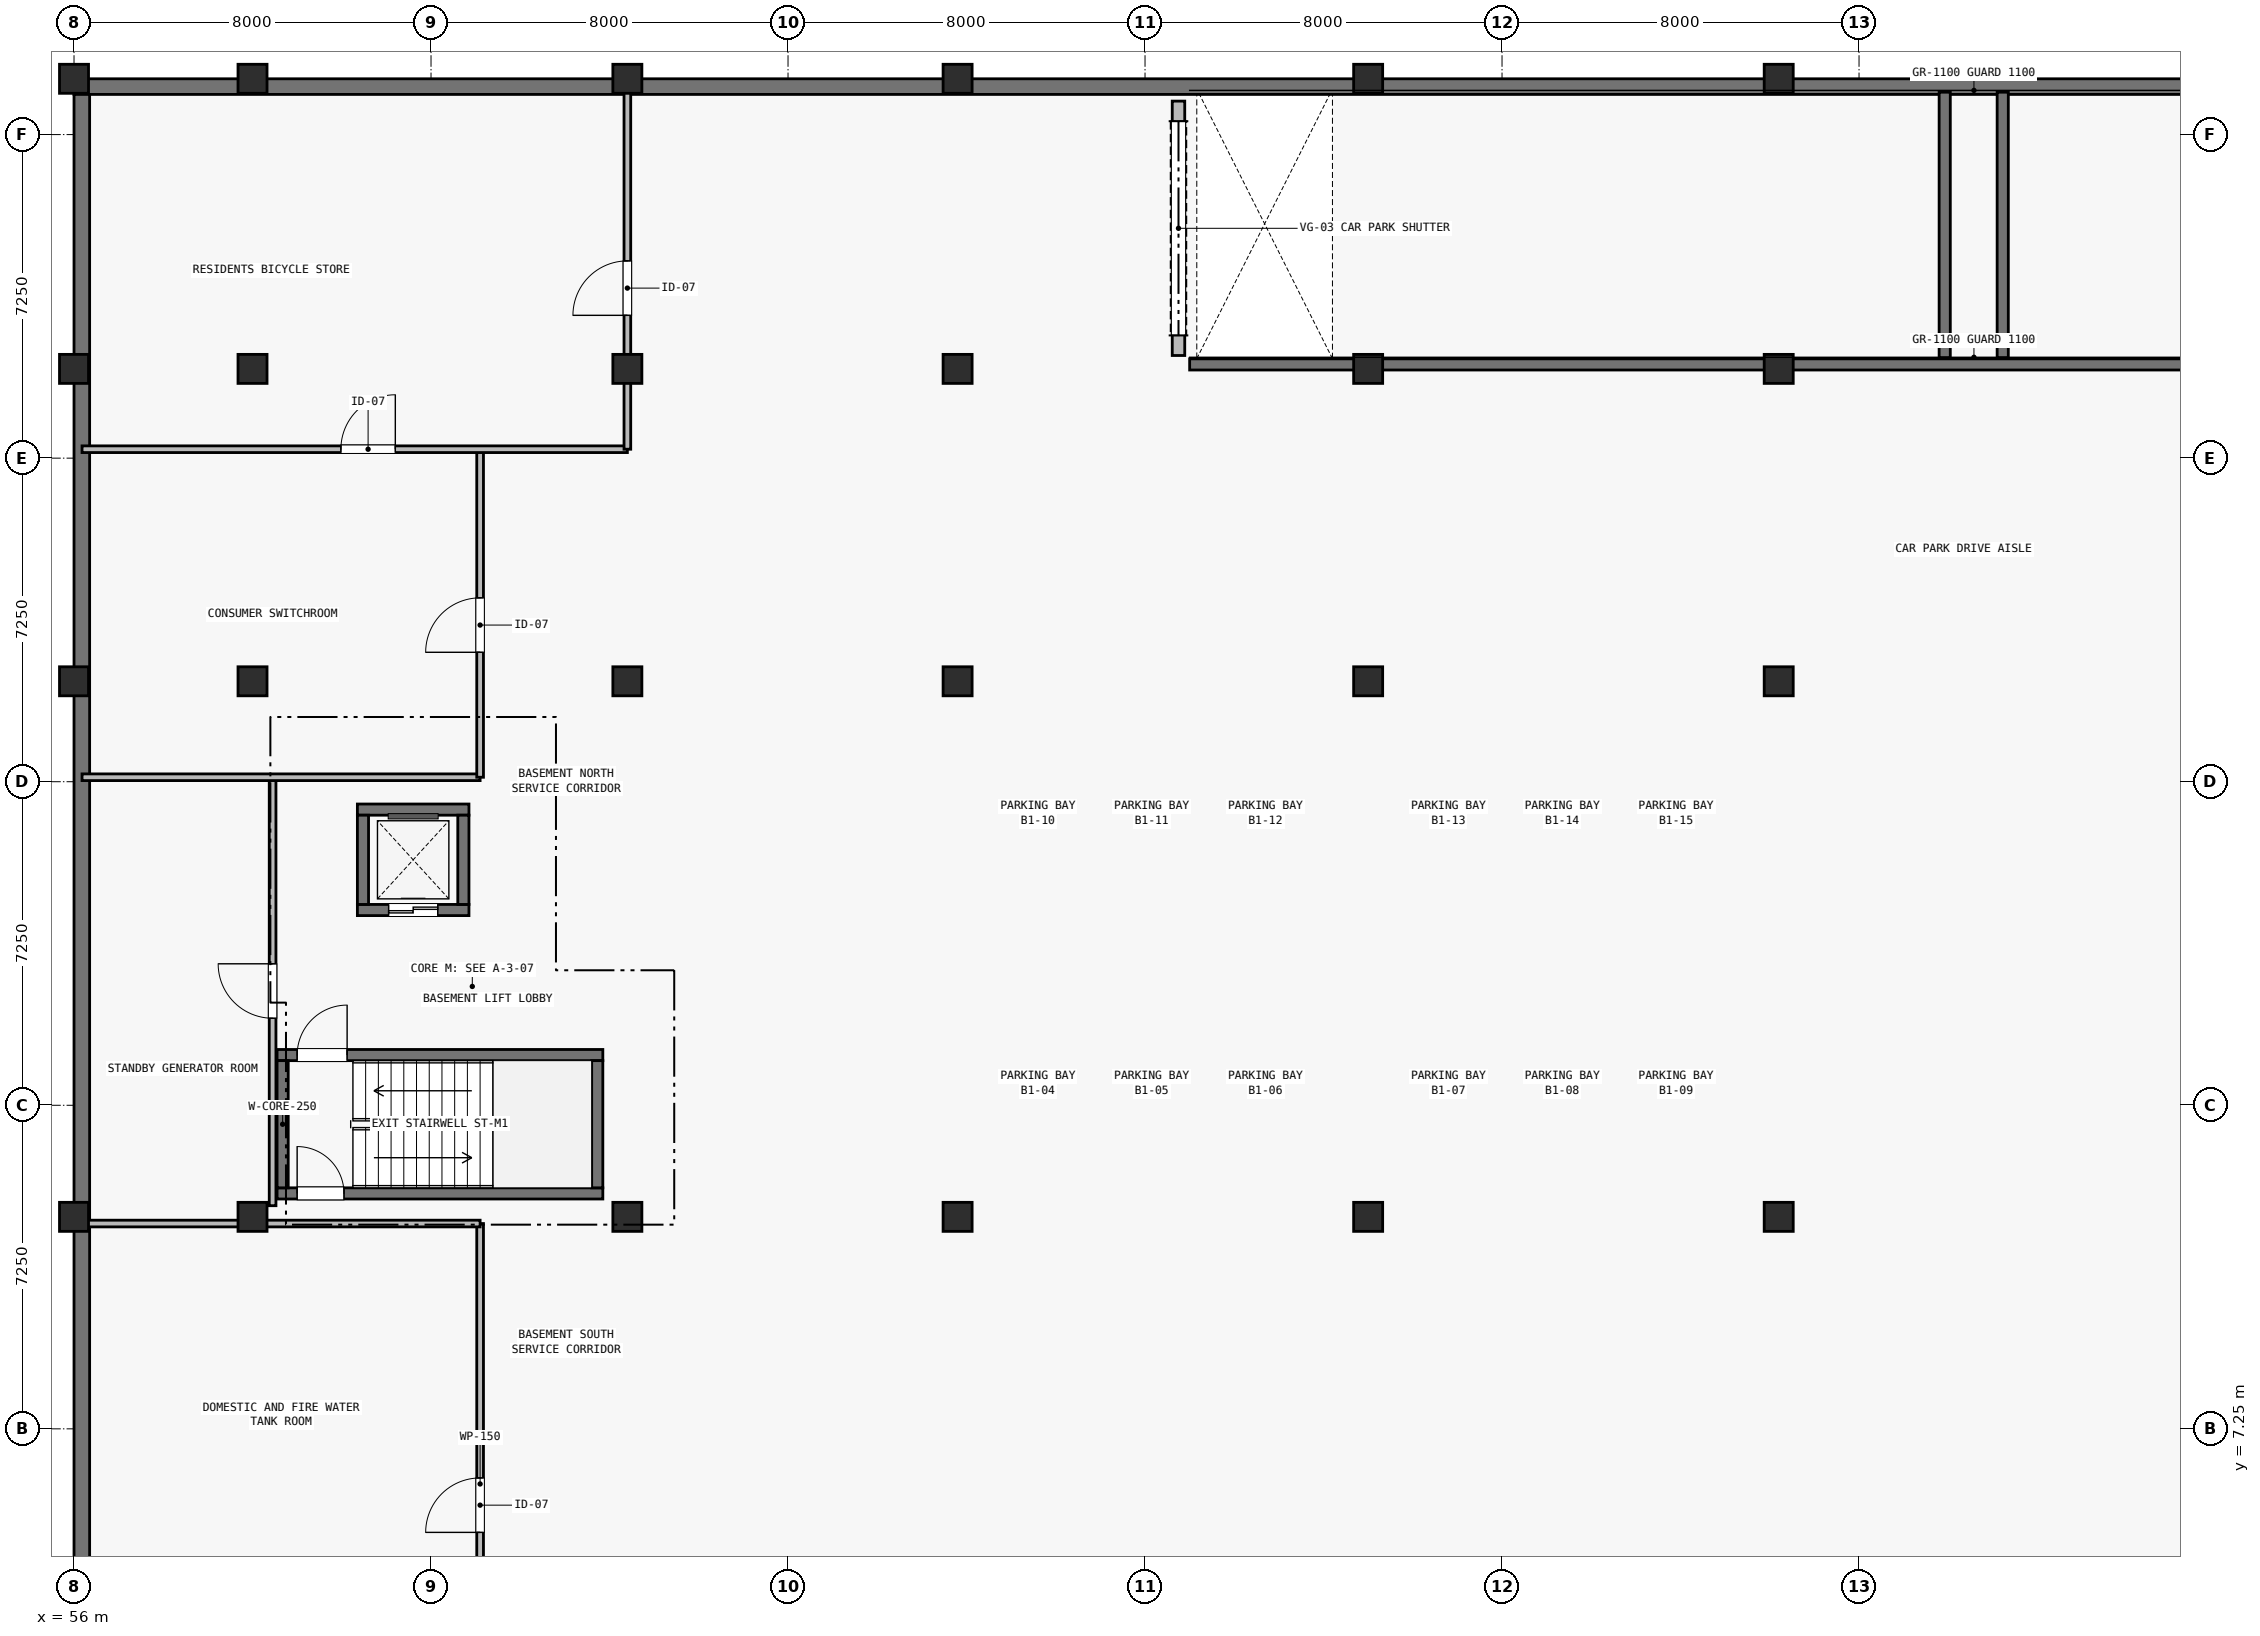
"""IFC4 building model, lengths in metres.
Left out: names, types, materials, properties, quantities, classifications, styles, units other than length and angle.
Written with IfcOpenShell. Run it as: python <this file> out.ifc"""

import sys

from ifc_helpers import new_model, si_unit, direction, frame, frame_2d, origin, origin_2d, place, context, subcontext, project, spatial, rectangle, extrude, element, fill, save


model = new_model("IFC4")
c1 = context("Model", 3, precision=1e-05, world=origin(), true_north=direction((0.0, 1.0)))
c2 = subcontext(c1, "Body", "Model", "MODEL_VIEW")
j1 = project(units=[si_unit("LENGTHUNIT", "METRE"), si_unit("PLANEANGLEUNIT", "RADIAN")], contexts=[c1])
p1 = place(None, origin())
s1 = spatial("IfcSite", under=j1, at=p1, CompositionType="ELEMENT")
p2 = place(p1, origin())
s2 = spatial("IfcBuilding", under=s1, at=p2, CompositionType="ELEMENT")
p3 = place(p2, frame((0.0, 0.0, -4.2)))
s3 = spatial("IfcBuildingStorey", under=s2, at=p3, CompositionType="ELEMENT", Elevation=-4.2)
p4 = place(p3, frame((56.0, 37.325, -0.35), z_axis=(0.0, 0.0, 1.0), x_axis=(1.0, 0.0, 0.0)))
e1 = element("IfcWall", 1, at=p4, inside=s3, PredefinedType="USERDEFINED", context=c2, shape_type="SweptSolid", body=[
    extrude(rectangle(XDim=60.5, YDim=0.35, at=frame_2d((30.25, 0.0))), origin(), (0.0, 0.0, 1.0), 4.2),
])
p5 = place(p3, frame((56.175, 0.35, -0.35), z_axis=(0.0, 0.0, 1.0), x_axis=(0.0, 1.0, 0.0)))
e2 = element("IfcWall", 2, at=p5, inside=s3, PredefinedType="USERDEFINED", context=c2, shape_type="SweptSolid", body=[
    extrude(rectangle(XDim=36.8, YDim=0.35, at=frame_2d((18.4, 0.0))), origin(), (0.0, 0.0, 1.0), 4.2),
])
for number, where, z_axis, x_axis in (
    (3, (56.0, 12.0, -0.35), (0.0, 0.0, 1.0), (1.0, 0.0, 0.0)),
    (4, (56.0, 24.0, -0.35), (0.0, 0.0, 1.0), (1.0, 0.0, 0.0)),
    (5, (56.0, 31.0, -0.35), (0.0, 0.0, 1.0), (1.0, 0.0, 0.0)),
    (6, (56.0, 37.5, -0.35), (0.0, 0.0, 1.0), (1.0, 0.0, 0.0)),
    (7, (60.0, 12.0, -0.35), (0.0, 0.0, 1.0), (1.0, 0.0, 0.0)),
    (8, (60.0, 24.0, -0.35), (0.0, 0.0, 1.0), (1.0, 0.0, 0.0)),
    (9, (60.0, 31.0, -0.35), (0.0, 0.0, 1.0), (1.0, 0.0, 0.0)),
    (10, (60.0, 37.5, -0.35), (0.0, 0.0, 1.0), (1.0, 0.0, 0.0)),
    (11, (68.4, 12.0, -0.35), (0.0, 0.0, 1.0), (1.0, 0.0, 0.0)),
    (12, (68.4, 24.0, -0.35), (0.0, 0.0, 1.0), (1.0, 0.0, 0.0)),
    (13, (68.4, 31.0, -0.35), (0.0, 0.0, 1.0), (1.0, 0.0, 0.0)),
    (14, (68.4, 37.5, -0.35), (0.0, 0.0, 1.0), (1.0, 0.0, 0.0)),
    (15, (75.8, 12.0, -0.35), (0.0, 0.0, 1.0), (1.0, 0.0, 0.0)),
    (16, (75.8, 24.0, -0.35), (0.0, 0.0, 1.0), (1.0, 0.0, 0.0)),
    (17, (75.8, 31.0, -0.35), (0.0, 0.0, 1.0), (1.0, 0.0, 0.0)),
    (18, (75.8, 37.5, -0.35), (0.0, 0.0, 1.0), (1.0, 0.0, 0.0)),
    (19, (85.0, 12.0, -0.35), (0.0, 0.0, 1.0), (1.0, 0.0, 0.0)),
    (20, (85.0, 24.0, -0.35), (0.0, 0.0, 1.0), (1.0, 0.0, 0.0)),
    (21, (85.0, 31.0, -0.35), (0.0, 0.0, 1.0), (1.0, 0.0, 0.0)),
    (22, (85.0, 37.5, -0.35), (0.0, 0.0, 1.0), (1.0, 0.0, 0.0)),
    (23, (94.2, 12.0, -0.35), (0.0, 0.0, 1.0), (1.0, 0.0, 0.0)),
    (24, (94.2, 24.0, -0.35), (0.0, 0.0, 1.0), (1.0, 0.0, 0.0)),
    (25, (94.2, 31.0, -0.35), (0.0, 0.0, 1.0), (1.0, 0.0, 0.0)),
    (26, (94.2, 37.5, -0.35), (0.0, 0.0, 1.0), (1.0, 0.0, 0.0)),
):
    element("IfcColumn", number, at=place(p3, frame(where, z_axis=z_axis, x_axis=x_axis)), inside=s3, PredefinedType="COLUMN", context=c2, shape_type="SweptSolid", body=[
        extrude(rectangle(XDim=0.65, YDim=0.65, at=origin_2d()), origin(), (0.0, 0.0, 1.0), 4.2),
    ])
p6 = place(p3, frame((60.55, 12.525, -0.35), z_axis=(0.0, 0.0, 1.0), x_axis=(1.0, 0.0, 0.0)))
e27 = element("IfcWall", 27, at=p6, inside=s3, PredefinedType="SHEAR", context=c2, shape_type="SweptSolid", body=[
    extrude(rectangle(XDim=7.3, YDim=0.25, at=frame_2d((3.65, 0.0))), origin(), (0.0, 0.0, 1.0), 4.2),
])
p7 = place(p6, frame((0.45, 0.0, 0.35)))
e28 = element("IfcOpeningElement", 28, at=p7, cuts=e27, PredefinedType="OPENING", context=c2, shape_type="SweptSolid", body=[
    extrude(rectangle(XDim=1.05, YDim=2.15, at=frame_2d((0.525, 1.075))), frame((0.0, 0.14, 0.0), z_axis=(0.0, -1.0, 0.0), x_axis=(1.0, 0.0, 0.0)), (0.0, 0.0, 1.0), 0.28),
])
p8 = place(p3, frame((60.55, 15.625, -0.35), z_axis=(0.0, 0.0, 1.0), x_axis=(1.0, 0.0, 0.0)))
e29 = element("IfcWall", 29, at=p8, inside=s3, PredefinedType="SHEAR", context=c2, shape_type="SweptSolid", body=[
    extrude(rectangle(XDim=7.3, YDim=0.25, at=frame_2d((3.65, 0.0))), origin(), (0.0, 0.0, 1.0), 4.2),
])
p9 = place(p8, frame((0.45, 0.0, 0.35)))
e30 = element("IfcOpeningElement", 30, at=p9, cuts=e29, PredefinedType="OPENING", context=c2, shape_type="SweptSolid", body=[
    extrude(rectangle(XDim=1.12, YDim=2.15, at=frame_2d((0.56, 1.075))), frame((0.0, 0.14, 0.0), z_axis=(0.0, -1.0, 0.0), x_axis=(1.0, 0.0, 0.0)), (0.0, 0.0, 1.0), 0.28),
])
for number, where, z_axis, x_axis in (
    (31, (60.675, 12.65, -0.35), (0.0, 0.0, 1.0), (0.0, 1.0, 0.0)),
    (32, (67.725, 12.65, -0.35), (0.0, 0.0, 1.0), (0.0, 1.0, 0.0)),
):
    element("IfcWall", number, at=place(p3, frame(where, z_axis=z_axis, x_axis=x_axis)), inside=s3, PredefinedType="SHEAR", context=c2, shape_type="SweptSolid", body=[
        extrude(rectangle(XDim=2.85, YDim=0.25, at=frame_2d((1.425, 0.0))), origin(), (0.0, 0.0, 1.0), 4.2),
    ])
p10 = place(p3, frame((62.35, 21.125, -0.35), z_axis=(0.0, 0.0, 1.0), x_axis=(1.0, 0.0, 0.0)))
e33 = element("IfcWall", 33, at=p10, inside=s3, PredefinedType="SHEAR", context=c2, shape_type="SweptSolid", body=[
    extrude(rectangle(XDim=2.5, YDim=0.25, at=frame_2d((1.25, 0.0))), origin(), (0.0, 0.0, 1.0), 4.2),
])
p11 = place(p3, frame((62.35, 18.875, -0.35), z_axis=(0.0, 0.0, 1.0), x_axis=(1.0, 0.0, 0.0)))
e34 = element("IfcWall", 34, at=p11, inside=s3, PredefinedType="SHEAR", context=c2, shape_type="SweptSolid", body=[
    extrude(rectangle(XDim=2.5, YDim=0.25, at=frame_2d((1.25, 0.0))), origin(), (0.0, 0.0, 1.0), 4.2),
])
p12 = place(p11, frame((0.7, 0.0, 0.35)))
e35 = element("IfcOpeningElement", 35, at=p12, cuts=e34, PredefinedType="OPENING", context=c2, shape_type="SweptSolid", body=[
    extrude(rectangle(XDim=1.1, YDim=2.15, at=frame_2d((0.55, 1.075))), frame((0.0, 0.14, 0.0), z_axis=(0.0, -1.0, 0.0), x_axis=(1.0, 0.0, 0.0)), (0.0, 0.0, 1.0), 0.28),
])
for number, where, z_axis, x_axis in (
    (36, (62.475, 19.0, -0.35), (0.0, 0.0, 1.0), (0.0, 1.0, 0.0)),
    (37, (64.725, 19.0, -0.35), (0.0, 0.0, 1.0), (0.0, 1.0, 0.0)),
):
    element("IfcWall", number, at=place(p3, frame(where, z_axis=z_axis, x_axis=x_axis)), inside=s3, PredefinedType="SHEAR", context=c2, shape_type="SweptSolid", body=[
        extrude(rectangle(XDim=2.0, YDim=0.25, at=frame_2d((1.0, 0.0))), origin(), (0.0, 0.0, 1.0), 4.2),
    ])
p13 = place(p3, frame((81.0, 31.1, -0.35), z_axis=(0.0, 0.0, 1.0), x_axis=(1.0, 0.0, 0.0)))
e38 = element("IfcWall", 38, at=p13, inside=s3, PredefinedType="SHEAR", context=c2, shape_type="SweptSolid", body=[
    extrude(rectangle(XDim=35.15, YDim=0.25, at=frame_2d((17.575, 0.0))), origin(), (0.0, 0.0, 1.0), 4.2),
])
for number, where, z_axis, x_axis in (
    (39, (97.92, 31.25, -0.35), (0.0, 0.0, 1.0), (0.0, 1.0, 0.0)),
    (40, (99.22, 31.25, -0.35), (0.0, 0.0, 1.0), (0.0, 1.0, 0.0)),
):
    element("IfcWall", number, at=place(p3, frame(where, z_axis=z_axis, x_axis=x_axis)), inside=s3, PredefinedType="SHEAR", context=c2, shape_type="SweptSolid", body=[
        extrude(rectangle(XDim=5.95, YDim=0.25, at=frame_2d((2.975, 0.0))), origin(), (0.0, 0.0, 1.0), 2.15),
    ])
p14 = place(p3, frame((80.75, 37.0, 0.0), z_axis=(0.0, 0.0, 1.0), x_axis=(0.0, -1.0, 0.0)))
e41 = element("IfcWall", 41, at=p14, inside=s3, PredefinedType="SOLIDWALL", context=c2, shape_type="SweptSolid", body=[
    extrude(rectangle(XDim=5.7, YDim=0.28, at=frame_2d((2.85, 0.0))), origin(), (0.0, 0.0, 1.0), 2.95),
])
p15 = place(p14, frame((0.45, 0.0, 0.0)))
e42 = element("IfcOpeningElement", 42, at=p15, cuts=e41, PredefinedType="OPENING", context=c2, shape_type="SweptSolid", body=[
    extrude(rectangle(XDim=4.8, YDim=2.5, at=frame_2d((2.4, 1.25))), frame((0.0, 0.155, 0.0), z_axis=(0.0, -1.0, 0.0), x_axis=(1.0, 0.0, 0.0)), (0.0, 0.0, 1.0), 0.31),
])
p16 = place(p3, frame((65.1, 0.18, 0.0), z_axis=(0.0, 0.0, 1.0), x_axis=(0.0, 1.0, 0.0)))
e43 = element("IfcWall", 43, at=p16, inside=s3, PredefinedType="PARTITIONING", context=c2, shape_type="SweptSolid", body=[
    extrude(rectangle(XDim=11.67, YDim=0.15, at=frame_2d((5.835, 0.0))), origin(), (0.0, 0.0, 1.0), 3.82),
])
p17 = place(p16, frame((4.75, 0.0, 0.0)))
e44 = element("IfcOpeningElement", 44, at=p17, cuts=e43, PredefinedType="OPENING", context=c2, shape_type="SweptSolid", body=[
    extrude(rectangle(XDim=1.22, YDim=2.15, at=frame_2d((0.61, 1.075))), frame((0.0, 0.09, 0.0), z_axis=(0.0, -1.0, 0.0), x_axis=(1.0, 0.0, 0.0)), (0.0, 0.0, 1.0), 0.18),
])
p18 = place(p3, frame((56.18, 11.85, 0.0), z_axis=(0.0, 0.0, 1.0), x_axis=(1.0, 0.0, 0.0)))
e45 = element("IfcWall", 45, at=p18, inside=s3, PredefinedType="PARTITIONING", context=c2, shape_type="SweptSolid", body=[
    extrude(rectangle(XDim=8.92, YDim=0.15, at=frame_2d((4.46, 0.0))), origin(), (0.0, 0.0, 1.0), 3.15),
])
p19 = place(p3, frame((60.45, 12.25, 0.0), z_axis=(0.0, 0.0, 1.0), x_axis=(0.0, 1.0, 0.0)))
e46 = element("IfcWall", 46, at=p19, inside=s3, PredefinedType="PARTITIONING", context=c2, shape_type="SweptSolid", body=[
    extrude(rectangle(XDim=9.6, YDim=0.15, at=frame_2d((4.8, 0.0))), origin(), (0.0, 0.0, 1.0), 3.82),
])
p20 = place(p19, frame((4.2, 0.0, 0.0)))
e47 = element("IfcOpeningElement", 47, at=p20, cuts=e46, PredefinedType="OPENING", context=c2, shape_type="SweptSolid", body=[
    extrude(rectangle(XDim=1.22, YDim=2.15, at=frame_2d((0.61, 1.075))), frame((0.0, 0.09, 0.0), z_axis=(0.0, -1.0, 0.0), x_axis=(1.0, 0.0, 0.0)), (0.0, 0.0, 1.0), 0.18),
])
p21 = place(p3, frame((56.18, 21.85, 0.0), z_axis=(0.0, 0.0, 1.0), x_axis=(1.0, 0.0, 0.0)))
e48 = element("IfcWall", 48, at=p21, inside=s3, PredefinedType="PARTITIONING", context=c2, shape_type="SweptSolid", body=[
    extrude(rectangle(XDim=8.92, YDim=0.15, at=frame_2d((4.46, 0.0))), origin(), (0.0, 0.0, 1.0), 3.82),
])
p22 = place(p3, frame((65.1, 21.85, 0.0), z_axis=(0.0, 0.0, 1.0), x_axis=(0.0, 1.0, 0.0)))
e49 = element("IfcWall", 49, at=p22, inside=s3, PredefinedType="PARTITIONING", context=c2, shape_type="SweptSolid", body=[
    extrude(rectangle(XDim=7.35, YDim=0.15, at=frame_2d((3.675, 0.0))), origin(), (0.0, 0.0, 1.0), 3.82),
])
p23 = place(p22, frame((2.8, 0.0, 0.0)))
e50 = element("IfcOpeningElement", 50, at=p23, cuts=e49, PredefinedType="OPENING", context=c2, shape_type="SweptSolid", body=[
    extrude(rectangle(XDim=1.22, YDim=2.15, at=frame_2d((0.61, 1.075))), frame((0.0, 0.09, 0.0), z_axis=(0.0, -1.0, 0.0), x_axis=(1.0, 0.0, 0.0)), (0.0, 0.0, 1.0), 0.18),
])
p24 = place(p3, frame((56.18, 29.2, 0.0), z_axis=(0.0, 0.0, 1.0), x_axis=(1.0, 0.0, 0.0)))
e51 = element("IfcWall", 51, at=p24, inside=s3, PredefinedType="PARTITIONING", context=c2, shape_type="SweptSolid", body=[
    extrude(rectangle(XDim=12.22, YDim=0.15, at=frame_2d((6.11, 0.0))), origin(), (0.0, 0.0, 1.0), 3.82),
])
p25 = place(p24, frame((5.8, 0.0, 0.0)))
e52 = element("IfcOpeningElement", 52, at=p25, cuts=e51, PredefinedType="OPENING", context=c2, shape_type="SweptSolid", body=[
    extrude(rectangle(XDim=1.22, YDim=2.15, at=frame_2d((0.61, 1.075))), frame((0.0, 0.09, 0.0), z_axis=(0.0, -1.0, 0.0), x_axis=(1.0, 0.0, 0.0)), (0.0, 0.0, 1.0), 0.18),
])
p26 = place(p3, frame((68.4, 29.2, 0.0), z_axis=(0.0, 0.0, 1.0), x_axis=(0.0, 1.0, 0.0)))
e53 = element("IfcWall", 53, at=p26, inside=s3, PredefinedType="PARTITIONING", context=c2, shape_type="SweptSolid", body=[
    extrude(rectangle(XDim=8.12, YDim=0.15, at=frame_2d((4.06, 0.0))), origin(), (0.0, 0.0, 1.0), 3.15),
])
p27 = place(p26, frame((3.0, 0.0, 0.0)))
e54 = element("IfcOpeningElement", 54, at=p27, cuts=e53, PredefinedType="OPENING", context=c2, shape_type="SweptSolid", body=[
    extrude(rectangle(XDim=1.22, YDim=2.15, at=frame_2d((0.61, 1.075))), frame((0.0, 0.09, 0.0), z_axis=(0.0, -1.0, 0.0), x_axis=(1.0, 0.0, 0.0)), (0.0, 0.0, 1.0), 0.18),
])
p28 = place(p15, origin())
e55 = element("IfcDoor", 55, at=p28, inside=s3, OperationType="ROLLINGUP", PredefinedType="DOOR", context=c2, shape_type="SweptSolid", body=[
    extrude(rectangle(XDim=4.8, YDim=2.5, at=frame_2d((2.4, 1.25))), frame((0.0, 0.025, 0.0), z_axis=(0.0, -1.0, 0.0), x_axis=(1.0, 0.0, 0.0)), (0.0, 0.0, 1.0), 0.05),
])
fill(e42, e55)
p29 = place(p17, origin())
e56 = element("IfcDoor", 56, at=p29, inside=s3, OperationType="SINGLE_SWING_LEFT", PredefinedType="DOOR", context=c2, shape_type="SweptSolid", body=[
    extrude(rectangle(XDim=1.22, YDim=2.15, at=frame_2d((0.61, 1.075))), frame((0.0, 0.025, 0.0), z_axis=(0.0, -1.0, 0.0), x_axis=(1.0, 0.0, 0.0)), (0.0, 0.0, 1.0), 0.05),
])
fill(e44, e56)
p30 = place(p20, origin())
e57 = element("IfcDoor", 57, at=p30, inside=s3, OperationType="SINGLE_SWING_RIGHT", PredefinedType="DOOR", context=c2, shape_type="SweptSolid", body=[
    extrude(rectangle(XDim=1.22, YDim=2.15, at=frame_2d((0.61, 1.075))), frame((0.0, 0.025, 0.0), z_axis=(0.0, -1.0, 0.0), x_axis=(1.0, 0.0, 0.0)), (0.0, 0.0, 1.0), 0.05),
])
fill(e47, e57)
p31 = place(p23, origin())
e58 = element("IfcDoor", 58, at=p31, inside=s3, OperationType="SINGLE_SWING_LEFT", PredefinedType="DOOR", context=c2, shape_type="SweptSolid", body=[
    extrude(rectangle(XDim=1.22, YDim=2.15, at=frame_2d((0.61, 1.075))), frame((0.0, 0.025, 0.0), z_axis=(0.0, -1.0, 0.0), x_axis=(1.0, 0.0, 0.0)), (0.0, 0.0, 1.0), 0.05),
])
fill(e50, e58)
p32 = place(p25, origin())
e59 = element("IfcDoor", 59, at=p32, inside=s3, OperationType="SINGLE_SWING_RIGHT", PredefinedType="DOOR", context=c2, shape_type="SweptSolid", body=[
    extrude(rectangle(XDim=1.22, YDim=2.15, at=frame_2d((0.61, 1.075))), frame((0.0, 0.025, 0.0), z_axis=(0.0, -1.0, 0.0), x_axis=(1.0, 0.0, 0.0)), (0.0, 0.0, 1.0), 0.05),
])
fill(e52, e59)
p33 = place(p27, origin())
e60 = element("IfcDoor", 60, at=p33, inside=s3, OperationType="SINGLE_SWING_LEFT", PredefinedType="DOOR", context=c2, shape_type="SweptSolid", body=[
    extrude(rectangle(XDim=1.22, YDim=2.15, at=frame_2d((0.61, 1.075))), frame((0.0, 0.025, 0.0), z_axis=(0.0, -1.0, 0.0), x_axis=(1.0, 0.0, 0.0)), (0.0, 0.0, 1.0), 0.05),
])
fill(e54, e60)
p34 = place(p7, origin())
e61 = element("IfcDoor", 61, at=p34, inside=s3, OperationType="SINGLE_SWING_LEFT", PredefinedType="DOOR", context=c2, shape_type="SweptSolid", body=[
    extrude(rectangle(XDim=1.05, YDim=2.15, at=frame_2d((0.525, 1.075))), frame((0.0, 0.025, 0.0), z_axis=(0.0, -1.0, 0.0), x_axis=(1.0, 0.0, 0.0)), (0.0, 0.0, 1.0), 0.05),
])
fill(e28, e61)
p35 = place(p9, origin())
e62 = element("IfcDoor", 62, at=p35, inside=s3, OperationType="SINGLE_SWING_RIGHT", PredefinedType="DOOR", context=c2, shape_type="SweptSolid", body=[
    extrude(rectangle(XDim=1.12, YDim=2.15, at=frame_2d((0.56, 1.075))), frame((0.0, 0.025, 0.0), z_axis=(0.0, -1.0, 0.0), x_axis=(1.0, 0.0, 0.0)), (0.0, 0.0, 1.0), 0.05),
])
fill(e30, e62)
p36 = place(p12, origin())
e63 = element("IfcDoor", 63, at=p36, inside=s3, OperationType="DOUBLE_DOOR_SLIDING", PredefinedType="DOOR", context=c2, shape_type="SweptSolid", body=[
    extrude(rectangle(XDim=1.1, YDim=2.15, at=frame_2d((0.55, 1.075))), frame((0.0, 0.025, 0.0), z_axis=(0.0, -1.0, 0.0), x_axis=(1.0, 0.0, 0.0)), (0.0, 0.0, 1.0), 0.05),
])
fill(e35, e63)
save(model, sys.argv[1])
